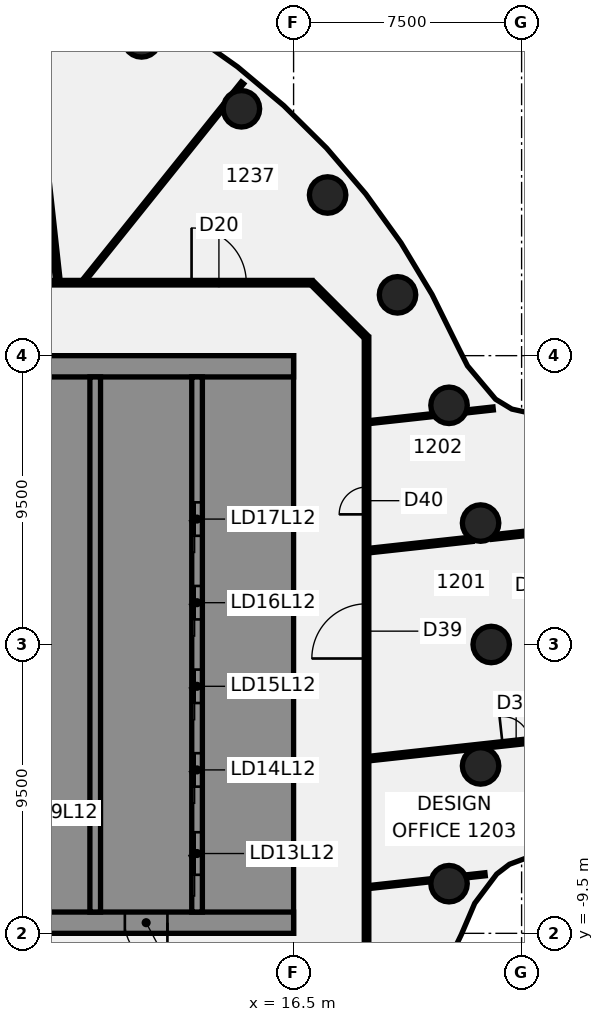
"""IFC4 building model, lengths in metres.
Left out: names, types, materials, properties, quantities, classifications, styles, units other than length and angle.
Written with IfcOpenShell. Run it as: python <this file> out.ifc"""

import sys

from ifc_helpers import new_model, si_unit, direction, frame, frame_2d, origin, origin_2d, place, context, subcontext, project, spatial, polyline, rectangle, circle, outline, extrude, element, fill, save


model = new_model("IFC4")
c1 = context("Model", 3, precision=1e-05, world=origin(), true_north=direction((0.0, 1.0)))
c2 = subcontext(c1, "Body", "Model", "MODEL_VIEW")
j1 = project(units=[si_unit("LENGTHUNIT", "METRE"), si_unit("PLANEANGLEUNIT", "RADIAN")], contexts=[c1])
p1 = place(None, origin())
s1 = spatial("IfcSite", under=j1, at=p1, CompositionType="ELEMENT")
p2 = place(p1, origin())
s2 = spatial("IfcBuilding", under=s1, at=p2, CompositionType="ELEMENT")
p3 = place(p2, frame((0.0, 0.0, 56.5)))
s3 = spatial("IfcBuildingStorey", under=s2, at=p3, CompositionType="ELEMENT", Elevation=56.5)
for number, where, z_axis, x_axis in (
    (1, (23.0, 0.0, -0.14), (0.0, 0.0, 1.0), (1.0, 0.0, 0.0)),
    (2, (22.651, 3.994, -0.14), (0.0, 0.0, 1.0), (1.0, 0.0, 0.0)),
    (3, (21.613, 7.866, -0.14), (0.0, 0.0, 1.0), (1.0, 0.0, 0.0)),
    (4, (19.919, 11.5, -0.14), (0.0, 0.0, 1.0), (1.0, 0.0, 0.0)),
    (5, (17.619, 14.784, -0.14), (0.0, 0.0, 1.0), (1.0, 0.0, 0.0)),
    (6, (14.784, 17.619, -0.14), (0.0, 0.0, 1.0), (1.0, 0.0, 0.0)),
    (7, (11.5, 19.919, -0.14), (0.0, 0.0, 1.0), (1.0, 0.0, 0.0)),
    (8, (21.613, -7.866, -0.14), (0.0, 0.0, 1.0), (1.0, 0.0, 0.0)),
    (9, (22.651, -3.994, -0.14), (0.0, 0.0, 1.0), (1.0, 0.0, 0.0)),
):
    element("IfcColumn", number, at=place(p3, frame(where, z_axis=z_axis, x_axis=x_axis)), inside=s3, PredefinedType="COLUMN", context=c2, shape_type="SweptSolid", body=[
        extrude(circle(Radius=0.6, at=origin_2d()), origin(), (0.0, 0.0, 1.0), 3.75),
    ])
p4 = place(p3, frame((7.752, 21.034, 0.0), z_axis=(0.0, 0.0, 1.0), x_axis=(0.109150907267, -0.994025190547, 0.0)))
e10 = element("IfcWall", 10, at=p4, inside=s3, PredefinedType="PARTITIONING", context=c2, shape_type="SweptSolid", body=[
    extrude(rectangle(XDim=9.124, YDim=0.15, at=frame_2d((4.562, 0.0))), origin(), (0.0, 0.0, 1.0), 3.01),
])
p5 = place(p3, frame((17.128, 11.872, 0.0), z_axis=(0.0, 0.0, 1.0), x_axis=(0.707106781187, -0.707106781187, 0.0)))
e11 = element("IfcWall", 11, at=p5, inside=s3, PredefinedType="PARTITIONING", context=c2, shape_type="SweptSolid", body=[
    extrude(rectangle(XDim=2.465, YDim=0.15, at=frame_2d((1.232, 0.0))), origin(), (0.0, 0.0, 1.0), 3.01),
])
p6 = place(p3, frame((-17.065, 11.9, 0.0), z_axis=(0.0, 0.0, 1.0), x_axis=(1.0, 0.0, 0.0)))
e12 = element("IfcWall", 12, at=p6, inside=s3, PredefinedType="PARTITIONING", context=c2, shape_type="SweptSolid", body=[
    extrude(rectangle(XDim=34.165, YDim=0.15, at=frame_2d((17.083, 0.0))), origin(), (0.0, 0.0, 1.0), 3.01),
])
p7 = place(p6, frame((17.304, 0.0, 0.0)))
e13 = element("IfcOpeningElement", 13, at=p7, cuts=e12, PredefinedType="OPENING", context=c2, shape_type="SweptSolid", body=[
    extrude(rectangle(XDim=1.8, YDim=2.1, at=frame_2d((0.9, 1.05))), frame((0.0, 0.085, 0.0), z_axis=(0.0, -1.0, 0.0), x_axis=(1.0, 0.0, 0.0)), (0.0, 0.0, 1.0), 0.17),
])
p8 = place(p6, frame((30.209, 0.0, 0.0)))
e14 = element("IfcOpeningElement", 14, at=p8, cuts=e12, PredefinedType="OPENING", context=c2, shape_type="SweptSolid", body=[
    extrude(rectangle(XDim=1.8, YDim=2.1, at=frame_2d((0.9, 1.05))), frame((0.0, 0.085, 0.0), z_axis=(0.0, -1.0, 0.0), x_axis=(1.0, 0.0, 0.0)), (0.0, 0.0, 1.0), 0.17),
])
p9 = place(p6, frame((5.528, 0.0, 0.0)))
e15 = element("IfcOpeningElement", 15, at=p9, cuts=e12, PredefinedType="OPENING", context=c2, shape_type="SweptSolid", body=[
    extrude(rectangle(XDim=1.8, YDim=2.1, at=frame_2d((0.9, 1.05))), frame((0.0, 0.085, 0.0), z_axis=(0.0, -1.0, 0.0), x_axis=(1.0, 0.0, 0.0)), (0.0, 0.0, 1.0), 0.17),
])
p10 = place(p3, frame((18.965, -3.754, 0.0), z_axis=(0.0, 0.0, 1.0), x_axis=(0.994024445996, 0.1091576876, 0.0)))
e16 = element("IfcWall", 16, at=p10, inside=s3, PredefinedType="PARTITIONING", context=c2, shape_type="SweptSolid", body=[
    extrude(rectangle(XDim=7.153, YDim=0.15, at=frame_2d((3.576, 0.0))), origin(), (0.0, 0.0, 1.0), 3.01),
])
p11 = place(p10, frame((4.435, 0.0, 0.0)))
e17 = element("IfcOpeningElement", 17, at=p11, cuts=e16, PredefinedType="OPENING", context=c2, shape_type="SweptSolid", body=[
    extrude(rectangle(XDim=0.9, YDim=2.1, at=frame_2d((0.45, 1.05))), frame((0.0, 0.085, 0.0), z_axis=(0.0, -1.0, 0.0), x_axis=(1.0, 0.0, 0.0)), (0.0, 0.0, 1.0), 0.17),
])
p12 = place(p3, frame((18.965, 3.087, 0.0), z_axis=(0.0, 0.0, 1.0), x_axis=(0.994017073769, 0.109224800551, 0.0)))
e18 = element("IfcWall", 18, at=p12, inside=s3, PredefinedType="PARTITIONING", context=c2, shape_type="SweptSolid", body=[
    extrude(rectangle(XDim=3.42, YDim=0.15, at=frame_2d((1.71, 0.0))), origin(), (0.0, 0.0, 1.0), 3.01),
])
p13 = place(p3, frame((23.023, 3.533, 0.0), z_axis=(0.0, 0.0, 1.0), x_axis=(0.994015092875, 0.109242826475, 0.0)))
e19 = element("IfcWall", 19, at=p13, inside=s3, PredefinedType="PARTITIONING", context=c2, shape_type="SweptSolid", body=[
    extrude(rectangle(XDim=2.322, YDim=0.15, at=frame_2d((1.161, 0.0))), origin(), (0.0, 0.0, 1.0), 3.01),
])
p14 = place(p3, frame((18.965, 7.312, 0.0), z_axis=(0.0, 0.0, 1.0), x_axis=(0.994002378956, 0.109358450201, 0.0)))
e20 = element("IfcWall", 20, at=p14, inside=s3, PredefinedType="PARTITIONING", context=c2, shape_type="SweptSolid", body=[
    extrude(rectangle(XDim=2.148, YDim=0.1, at=frame_2d((1.074, 0.0))), origin(), (0.0, 0.0, 1.0), 3.01),
])
p15 = place(p3, frame((22.169, 7.664, 0.0), z_axis=(0.0, 0.0, 1.0), x_axis=(0.993995521714, 0.109420760428, 0.0)))
e21 = element("IfcWall", 21, at=p15, inside=s3, PredefinedType="PARTITIONING", context=c2, shape_type="SweptSolid", body=[
    extrude(rectangle(XDim=0.901, YDim=0.1, at=frame_2d((0.451, 0.0))), origin(), (0.0, 0.0, 1.0), 3.01),
])
p16 = place(p3, frame((18.965, -7.979, 0.0), z_axis=(0.0, 0.0, 1.0), x_axis=(0.994020279747, 0.109195620111, 0.0)))
e22 = element("IfcWall", 22, at=p16, inside=s3, PredefinedType="PARTITIONING", context=c2, shape_type="SweptSolid", body=[
    extrude(rectangle(XDim=2.082, YDim=0.1, at=frame_2d((1.041, 0.0))), origin(), (0.0, 0.0, 1.0), 3.01),
])
p17 = place(p3, frame((22.159, -7.628, 0.0), z_axis=(0.0, 0.0, 1.0), x_axis=(0.994017126998, 0.10922431613, 0.0)))
e23 = element("IfcWall", 23, at=p17, inside=s3, PredefinedType="PARTITIONING", context=c2, shape_type="SweptSolid", body=[
    extrude(rectangle(XDim=0.644, YDim=0.1, at=frame_2d((0.322, 0.0))), origin(), (0.0, 0.0, 1.0), 3.01),
])
p18 = place(p3, frame((9.617, 11.989, 0.0), z_axis=(0.0, 0.0, 1.0), x_axis=(0.625675340488, 0.78008356495, 0.0)))
e24 = element("IfcWall", 24, at=p18, inside=s3, PredefinedType="PARTITIONING", context=c2, shape_type="SweptSolid", body=[
    extrude(rectangle(XDim=7.316, YDim=0.1, at=frame_2d((3.658, 0.0))), origin(), (0.0, 0.0, 1.0), 3.01),
])
p19 = place(p3, frame((14.578, 18.174, 0.0), z_axis=(0.0, 0.0, 1.0), x_axis=(0.625551826344, 0.780182614878, 0.0)))
e25 = element("IfcWall", 25, at=p19, inside=s3, PredefinedType="PARTITIONING", context=c2, shape_type="SweptSolid", body=[
    extrude(rectangle(XDim=0.382, YDim=0.1, at=frame_2d((0.191, 0.0))), origin(), (0.0, 0.0, 1.0), 3.01),
])
p20 = place(p3, frame((18.9, -10.1, 0.0), z_axis=(0.0, 0.0, 1.0), x_axis=(0.0, 1.0, 0.0)))
e26 = element("IfcWall", 26, at=p20, inside=s3, PredefinedType="PARTITIONING", context=c2, shape_type="SweptSolid", body=[
    extrude(rectangle(XDim=20.2, YDim=0.15, at=frame_2d((10.1, 0.0))), origin(), (0.0, 0.0, 1.0), 3.01),
])
p21 = place(p20, frame((9.639, 0.0, 0.0)))
e27 = element("IfcOpeningElement", 27, at=p21, cuts=e26, PredefinedType="OPENING", context=c2, shape_type="SweptSolid", body=[
    extrude(rectangle(XDim=1.8, YDim=2.1, at=frame_2d((0.9, 1.05))), frame((0.0, 0.085, 0.0), z_axis=(0.0, -1.0, 0.0), x_axis=(1.0, 0.0, 0.0)), (0.0, 0.0, 1.0), 0.17),
])
p22 = place(p20, frame((14.38, 0.0, 0.0)))
e28 = element("IfcOpeningElement", 28, at=p22, cuts=e26, PredefinedType="OPENING", context=c2, shape_type="SweptSolid", body=[
    extrude(rectangle(XDim=0.9, YDim=2.1, at=frame_2d((0.45, 1.05))), frame((0.0, 0.085, 0.0), z_axis=(0.0, -1.0, 0.0), x_axis=(1.0, 0.0, 0.0)), (0.0, 0.0, 1.0), 0.17),
])
p23 = place(p3, frame((16.5, -9.15, 0.0), z_axis=(0.0, 0.0, 1.0), x_axis=(-1.0, 0.0, 0.0)))
e29 = element("IfcWall", 29, at=p23, inside=s3, PredefinedType="SHEAR", context=c2, shape_type="SweptSolid", body=[
    extrude(rectangle(XDim=13.0, YDim=0.7, at=frame_2d((6.5, 0.0))), origin(), (0.0, 0.0, 1.0), 3.61),
])
p24 = place(p23, frame((4.15, 0.0, 0.0)))
e30 = element("IfcOpeningElement", 30, at=p24, cuts=e29, PredefinedType="OPENING", context=c2, shape_type="SweptSolid", body=[
    extrude(rectangle(XDim=1.4, YDim=2.1, at=frame_2d((0.7, 1.05))), frame((0.0, 0.36, 0.0), z_axis=(0.0, -1.0, 0.0), x_axis=(1.0, 0.0, 0.0)), (0.0, 0.0, 1.0), 0.72),
])
p25 = place(p23, frame((10.125, 0.0, 0.0)))
e31 = element("IfcOpeningElement", 31, at=p25, cuts=e29, PredefinedType="OPENING", context=c2, shape_type="SweptSolid", body=[
    extrude(rectangle(XDim=1.4, YDim=2.1, at=frame_2d((0.7, 1.05))), frame((0.0, 0.36, 0.0), z_axis=(0.0, -1.0, 0.0), x_axis=(1.0, 0.0, 0.0)), (0.0, 0.0, 1.0), 0.72),
])
p26 = place(p3, origin())
e32 = element("IfcWall", 32, at=p26, inside=s3, PredefinedType="SHEAR", context=c2, shape_type="SweptSolid", body=[
    extrude(outline(polyline([(13.5, -8.8), (15.8, -8.8), (16.5, -8.8), (16.5, 8.8), (15.8, 8.8), (13.5, 8.8), (13.5, 8.125), (15.8, 8.125), (15.8, 5.625), (13.5, 5.625), (13.5, 5.375), (15.8, 5.375), (15.8, 2.875), (13.5, 2.875), (13.5, 2.625), (15.8, 2.625), (15.8, 0.125), (13.5, 0.125), (13.5, -0.125), (15.8, -0.125), (15.8, -2.625), (13.5, -2.625), (13.5, -2.875), (15.8, -2.875), (15.8, -5.375), (13.5, -5.375), (13.5, -5.625), (15.8, -5.625), (15.8, -8.125), (13.5, -8.125), (13.5, -8.8)])), origin(), (0.0, 0.0, 1.0), 3.61),
])
p27 = place(p3, frame((16.5, 9.15, 0.0), z_axis=(0.0, 0.0, 1.0), x_axis=(-1.0, 0.0, 0.0)))
e33 = element("IfcWall", 33, at=p27, inside=s3, PredefinedType="SHEAR", context=c2, shape_type="SweptSolid", body=[
    extrude(rectangle(XDim=13.0, YDim=0.7, at=frame_2d((6.5, 0.0))), origin(), (0.0, 0.0, 1.0), 3.61),
])
p28 = place(p3, origin())
e34 = element("IfcWall", 34, at=p28, inside=s3, PredefinedType="SHEAR", context=c2, shape_type="SweptSolid", body=[
    extrude(outline(polyline([(9.8, -5.375), (7.5, -5.375), (7.5, -2.875), (9.8, -2.875), (9.8, -2.625), (7.5, -2.625), (7.5, -0.125), (9.8, -0.125), (9.8, 0.125), (7.5, 0.125), (7.5, 2.625), (9.8, 2.625), (9.8, 2.875), (7.5, 2.875), (7.5, 5.375), (9.8, 5.375), (9.8, 5.625), (7.5, 5.625), (7.5, 8.125), (9.8, 8.125), (9.8, 8.8), (7.5, 8.8), (7.15, 8.8), (7.15, -5.625), (7.5, -5.625), (9.8, -5.625), (9.8, -5.375)])), origin(), (0.0, 0.0, 1.0), 3.61),
])
p29 = place(p3, origin())
e35 = element("IfcWall", 35, at=p29, inside=s3, PredefinedType="SHEAR", context=c2, shape_type="SweptSolid", body=[
    extrude(outline(polyline([(7.5, -8.125), (7.5, -8.8), (9.8, -8.8), (9.8, -8.125), (9.8, -5.625), (9.55, -5.625), (9.55, -8.125), (7.5, -8.125)])), origin(), (0.0, 0.0, 1.0), 3.61),
])
p30 = place(p3, frame((13.325, -8.8, 0.0), z_axis=(0.0, 0.0, 1.0), x_axis=(0.0, 1.0, 0.0)))
e36 = element("IfcWall", 36, at=p30, inside=s3, PredefinedType="SHEAR", context=c2, shape_type="SweptSolid", body=[
    extrude(rectangle(XDim=17.6, YDim=0.35, at=frame_2d((8.8, 0.0))), origin(), (0.0, 0.0, 1.0), 3.61),
])
p31 = place(p30, frame((1.225, 0.0, 0.0)))
e37 = element("IfcOpeningElement", 37, at=p31, cuts=e36, PredefinedType="OPENING", context=c2, shape_type="SweptSolid", body=[
    extrude(rectangle(XDim=1.4, YDim=2.1, at=frame_2d((0.7, 1.05))), frame((0.0, 0.185, 0.0), z_axis=(0.0, -1.0, 0.0), x_axis=(1.0, 0.0, 0.0)), (0.0, 0.0, 1.0), 0.37),
])
p32 = place(p30, frame((4.125, 0.0, 0.0)))
e38 = element("IfcOpeningElement", 38, at=p32, cuts=e36, PredefinedType="OPENING", context=c2, shape_type="SweptSolid", body=[
    extrude(rectangle(XDim=1.1, YDim=2.1, at=frame_2d((0.55, 1.05))), frame((0.0, 0.185, 0.0), z_axis=(0.0, -1.0, 0.0), x_axis=(1.0, 0.0, 0.0)), (0.0, 0.0, 1.0), 0.37),
])
p33 = place(p30, frame((6.875, 0.0, 0.0)))
e39 = element("IfcOpeningElement", 39, at=p33, cuts=e36, PredefinedType="OPENING", context=c2, shape_type="SweptSolid", body=[
    extrude(rectangle(XDim=1.1, YDim=2.1, at=frame_2d((0.55, 1.05))), frame((0.0, 0.185, 0.0), z_axis=(0.0, -1.0, 0.0), x_axis=(1.0, 0.0, 0.0)), (0.0, 0.0, 1.0), 0.37),
])
p34 = place(p30, frame((9.625, 0.0, 0.0)))
e40 = element("IfcOpeningElement", 40, at=p34, cuts=e36, PredefinedType="OPENING", context=c2, shape_type="SweptSolid", body=[
    extrude(rectangle(XDim=1.1, YDim=2.1, at=frame_2d((0.55, 1.05))), frame((0.0, 0.185, 0.0), z_axis=(0.0, -1.0, 0.0), x_axis=(1.0, 0.0, 0.0)), (0.0, 0.0, 1.0), 0.37),
])
p35 = place(p30, frame((12.375, 0.0, 0.0)))
e41 = element("IfcOpeningElement", 41, at=p35, cuts=e36, PredefinedType="OPENING", context=c2, shape_type="SweptSolid", body=[
    extrude(rectangle(XDim=1.1, YDim=2.1, at=frame_2d((0.55, 1.05))), frame((0.0, 0.185, 0.0), z_axis=(0.0, -1.0, 0.0), x_axis=(1.0, 0.0, 0.0)), (0.0, 0.0, 1.0), 0.37),
])
p36 = place(p3, frame((9.975, -8.8, 0.0), z_axis=(0.0, 0.0, 1.0), x_axis=(0.0, 1.0, 0.0)))
e42 = element("IfcWall", 42, at=p36, inside=s3, PredefinedType="SHEAR", context=c2, shape_type="SweptSolid", body=[
    extrude(rectangle(XDim=17.6, YDim=0.35, at=frame_2d((8.8, 0.0))), origin(), (0.0, 0.0, 1.0), 3.61),
])
p37 = place(p8, origin())
e43 = element("IfcDoor", 43, at=p37, inside=s3, OperationType="DOUBLE_DOOR_SINGLE_SWING", PredefinedType="DOOR", context=c2, shape_type="SweptSolid", body=[
    extrude(rectangle(XDim=1.8, YDim=2.1, at=frame_2d((0.9, 1.05))), frame((0.0, 0.025, 0.0), z_axis=(0.0, -1.0, 0.0), x_axis=(1.0, 0.0, 0.0)), (0.0, 0.0, 1.0), 0.05),
])
fill(e14, e43)
p38 = place(p11, frame((0.9, 0.0, 0.0), z_axis=(0.0, 0.0, 1.0), x_axis=(-1.0, 0.0, 0.0)))
e44 = element("IfcDoor", 44, at=p38, inside=s3, OperationType="SINGLE_SWING_RIGHT", PredefinedType="DOOR", context=c2, shape_type="SweptSolid", body=[
    extrude(rectangle(XDim=0.9, YDim=2.1, at=frame_2d((0.45, 1.05))), frame((0.0, 0.025, 0.0), z_axis=(0.0, -1.0, 0.0), x_axis=(1.0, 0.0, 0.0)), (0.0, 0.0, 1.0), 0.05),
])
fill(e17, e44)
p39 = place(p21, origin())
e45 = element("IfcDoor", 45, at=p39, inside=s3, OperationType="DOUBLE_DOOR_SINGLE_SWING", PredefinedType="DOOR", context=c2, shape_type="SweptSolid", body=[
    extrude(rectangle(XDim=1.8, YDim=2.1, at=frame_2d((0.9, 1.05))), frame((0.0, 0.025, 0.0), z_axis=(0.0, -1.0, 0.0), x_axis=(1.0, 0.0, 0.0)), (0.0, 0.0, 1.0), 0.05),
])
fill(e27, e45)
p40 = place(p22, frame((0.9, 0.0, 0.0), z_axis=(0.0, 0.0, 1.0), x_axis=(-1.0, 0.0, 0.0)))
e46 = element("IfcDoor", 46, at=p40, inside=s3, OperationType="SINGLE_SWING_RIGHT", PredefinedType="DOOR", context=c2, shape_type="SweptSolid", body=[
    extrude(rectangle(XDim=0.9, YDim=2.1, at=frame_2d((0.45, 1.05))), frame((0.0, 0.025, 0.0), z_axis=(0.0, -1.0, 0.0), x_axis=(1.0, 0.0, 0.0)), (0.0, 0.0, 1.0), 0.05),
])
fill(e28, e46)
p41 = place(p24, origin())
e47 = element("IfcDoor", 47, at=p41, inside=s3, OperationType="SINGLE_SWING_LEFT", PredefinedType="DOOR", context=c2, shape_type="SweptSolid", body=[
    extrude(rectangle(XDim=1.4, YDim=2.1, at=frame_2d((0.7, 1.05))), frame((0.0, 0.025, 0.0), z_axis=(0.0, -1.0, 0.0), x_axis=(1.0, 0.0, 0.0)), (0.0, 0.0, 1.0), 0.05),
])
fill(e30, e47)
p42 = place(p31, origin())
e48 = element("IfcDoor", 48, at=p42, inside=s3, OperationType="SLIDING_TO_LEFT", PredefinedType="DOOR", context=c2, shape_type="SweptSolid", body=[
    extrude(rectangle(XDim=1.4, YDim=2.1, at=frame_2d((0.7, 1.05))), frame((0.0, 0.025, 0.0), z_axis=(0.0, -1.0, 0.0), x_axis=(1.0, 0.0, 0.0)), (0.0, 0.0, 1.0), 0.05),
])
fill(e37, e48)
p43 = place(p32, origin())
e49 = element("IfcDoor", 49, at=p43, inside=s3, OperationType="SLIDING_TO_LEFT", PredefinedType="DOOR", context=c2, shape_type="SweptSolid", body=[
    extrude(rectangle(XDim=1.1, YDim=2.1, at=frame_2d((0.55, 1.05))), frame((0.0, 0.025, 0.0), z_axis=(0.0, -1.0, 0.0), x_axis=(1.0, 0.0, 0.0)), (0.0, 0.0, 1.0), 0.05),
])
fill(e38, e49)
p44 = place(p33, origin())
e50 = element("IfcDoor", 50, at=p44, inside=s3, OperationType="SLIDING_TO_LEFT", PredefinedType="DOOR", context=c2, shape_type="SweptSolid", body=[
    extrude(rectangle(XDim=1.1, YDim=2.1, at=frame_2d((0.55, 1.05))), frame((0.0, 0.025, 0.0), z_axis=(0.0, -1.0, 0.0), x_axis=(1.0, 0.0, 0.0)), (0.0, 0.0, 1.0), 0.05),
])
fill(e39, e50)
p45 = place(p34, origin())
e51 = element("IfcDoor", 51, at=p45, inside=s3, OperationType="SLIDING_TO_LEFT", PredefinedType="DOOR", context=c2, shape_type="SweptSolid", body=[
    extrude(rectangle(XDim=1.1, YDim=2.1, at=frame_2d((0.55, 1.05))), frame((0.0, 0.025, 0.0), z_axis=(0.0, -1.0, 0.0), x_axis=(1.0, 0.0, 0.0)), (0.0, 0.0, 1.0), 0.05),
])
fill(e40, e51)
p46 = place(p35, origin())
e52 = element("IfcDoor", 52, at=p46, inside=s3, OperationType="SLIDING_TO_LEFT", PredefinedType="DOOR", context=c2, shape_type="SweptSolid", body=[
    extrude(rectangle(XDim=1.1, YDim=2.1, at=frame_2d((0.55, 1.05))), frame((0.0, 0.025, 0.0), z_axis=(0.0, -1.0, 0.0), x_axis=(1.0, 0.0, 0.0)), (0.0, 0.0, 1.0), 0.05),
])
fill(e41, e52)
save(model, sys.argv[1])
